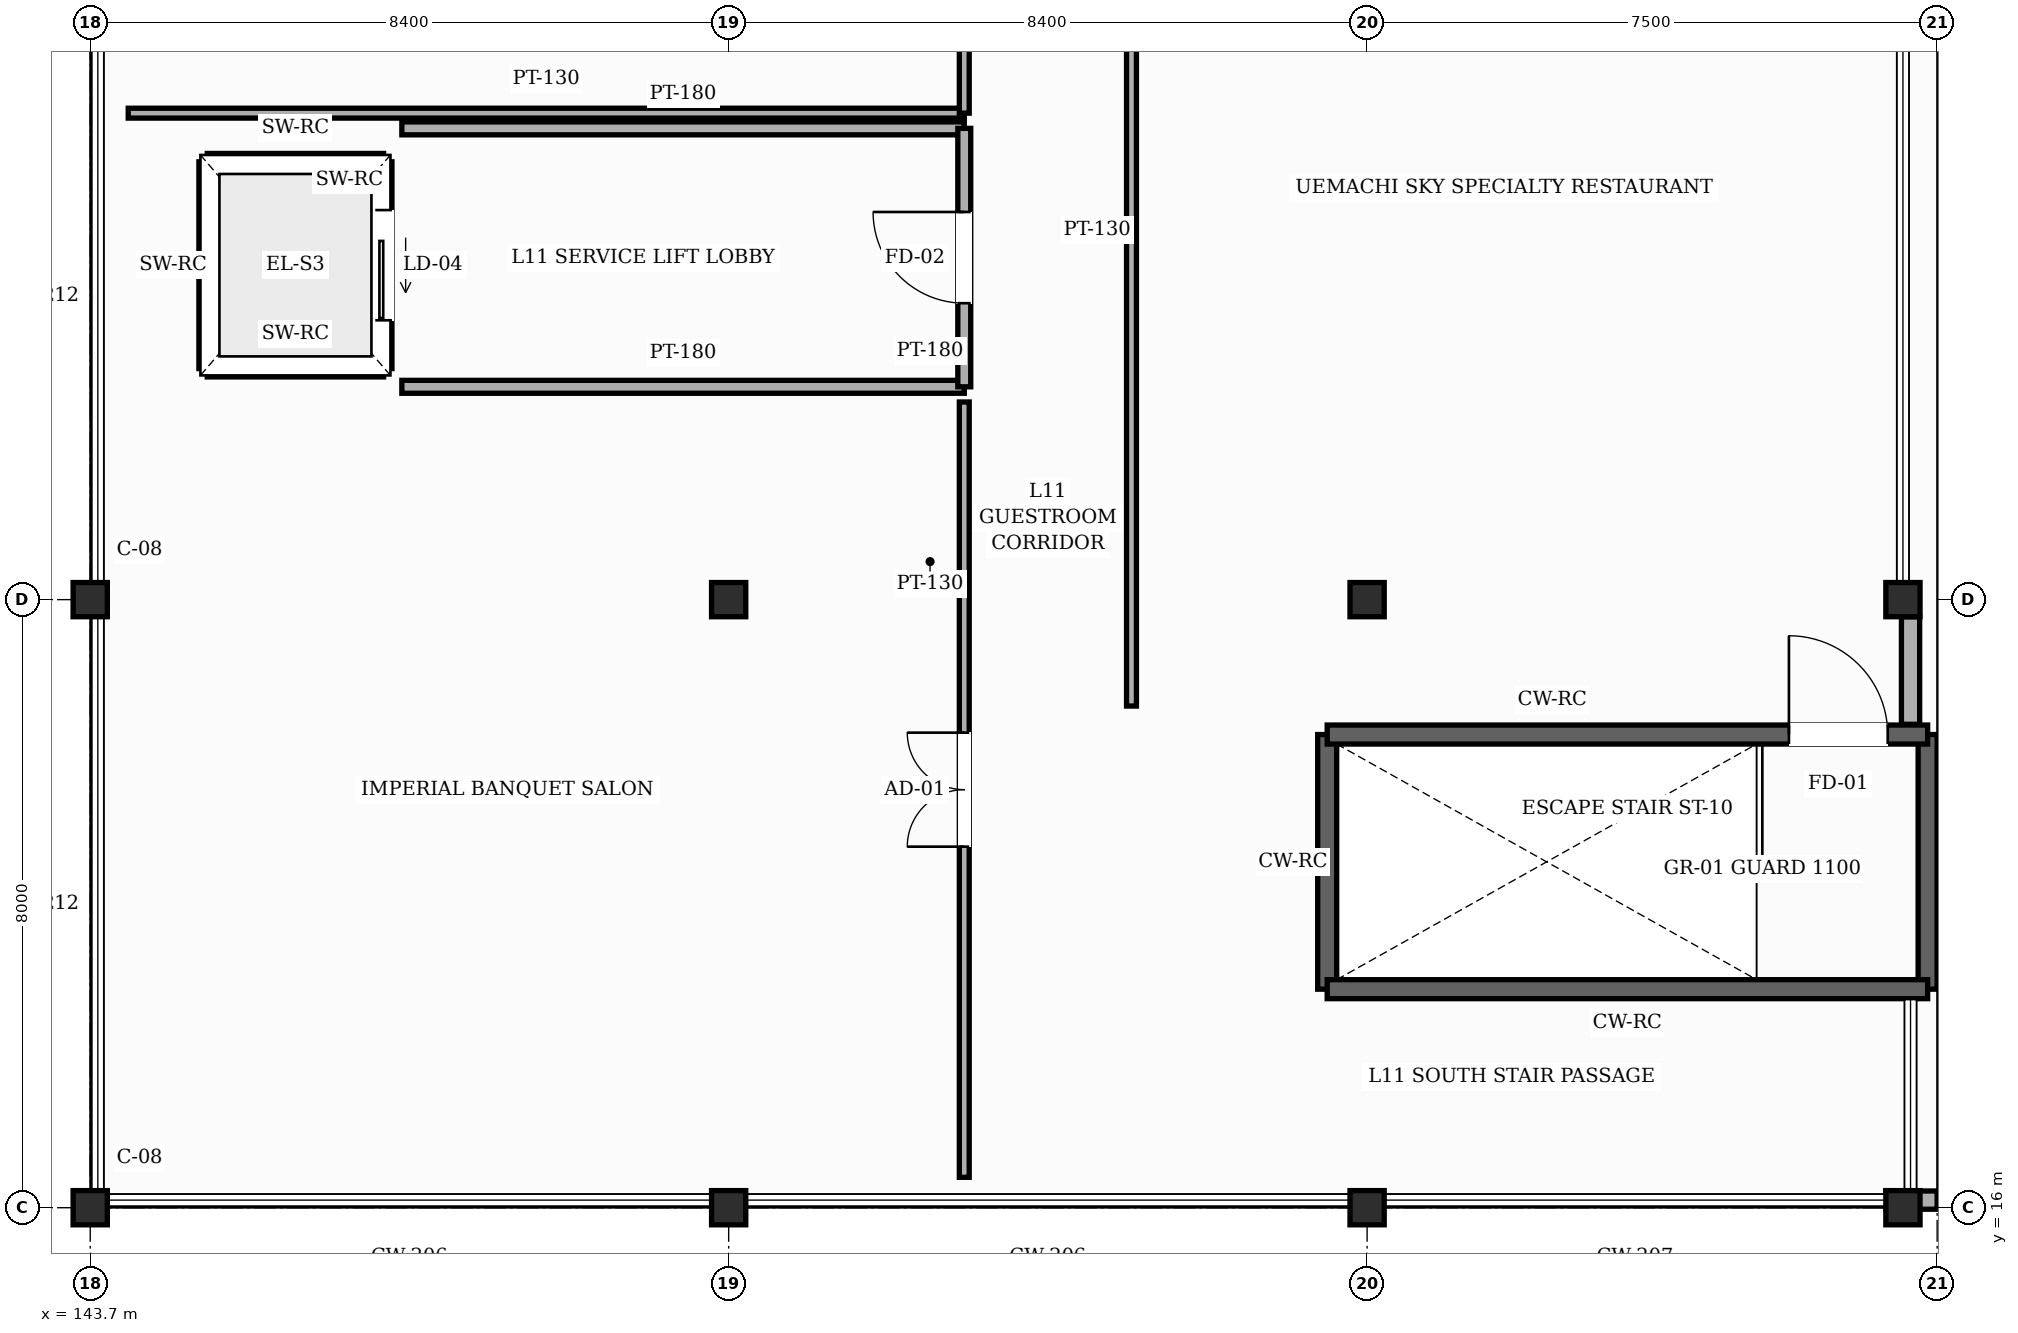
"""IFC4 building model, lengths in metres.
Left out: names, types, materials, properties, quantities, classifications, styles, units other than length and angle.
Written with IfcOpenShell. Run it as: python <this file> out.ifc"""

import sys

from ifc_helpers import new_model, si_unit, direction, frame, frame_2d, origin, origin_2d, place, context, subcontext, project, spatial, rectangle, hollow_rectangle, extrude, element, fill, save


model = new_model("IFC4")
c1 = context("Model", 3, precision=1e-05, world=origin(), true_north=direction((0.0, 1.0)))
c2 = subcontext(c1, "Body", "Model", "MODEL_VIEW")
j1 = project(units=[si_unit("LENGTHUNIT", "METRE"), si_unit("PLANEANGLEUNIT", "RADIAN")], contexts=[c1])
p1 = place(None, origin())
s1 = spatial("IfcSite", under=j1, at=p1, CompositionType="ELEMENT")
p2 = place(p1, origin())
s2 = spatial("IfcBuilding", under=s1, at=p2, CompositionType="ELEMENT")
p3 = place(p2, frame((0.0, 0.0, 46.2)))
s3 = spatial("IfcBuildingStorey", under=s2, at=p3, CompositionType="ELEMENT", Elevation=46.2)
for number, where, z_axis, x_axis in (
    (1, (143.7, 16.0, 0.0), (0.0, 0.0, 1.0), (1.0, 0.0, 0.0)),
    (2, (143.7, 24.0, 0.0), (0.0, 0.0, 1.0), (1.0, 0.0, 0.0)),
    (3, (152.1, 16.0, 0.0), (0.0, 0.0, 1.0), (1.0, 0.0, 0.0)),
    (4, (152.1, 24.0, 0.0), (0.0, 0.0, 1.0), (1.0, 0.0, 0.0)),
    (5, (160.5, 16.0, 0.0), (0.0, 0.0, 1.0), (1.0, 0.0, 0.0)),
    (6, (160.5, 24.0, 0.0), (0.0, 0.0, 1.0), (1.0, 0.0, 0.0)),
    (7, (167.55, 16.0, 0.0), (0.0, 0.0, 1.0), (1.0, 0.0, 0.0)),
    (8, (167.55, 24.0, 0.0), (0.0, 0.0, 1.0), (1.0, 0.0, 0.0)),
):
    element("IfcColumn", number, at=place(p3, frame(where, z_axis=z_axis, x_axis=x_axis)), inside=s3, PredefinedType="COLUMN", context=c2, shape_type="SweptSolid", body=[
        extrude(hollow_rectangle(XDim=0.45, YDim=0.45, WallThickness=0.019, InnerFilletRadius=0.019, OuterFilletRadius=0.038, at=origin_2d()), origin(), (0.0, 0.0, 1.0), 3.99),
    ])
p4 = place(p3, frame((168.0, 16.1, 0.0), z_axis=(0.0, 0.0, 1.0), x_axis=(-1.0, 0.0, 0.0)))
e9 = element("IfcWall", 9, at=p4, inside=s3, PredefinedType="SOLIDWALL", context=c2, shape_type="SweptSolid", body=[
    extrude(rectangle(XDim=0.675, YDim=0.24, at=frame_2d((0.337, 0.0))), origin(), (0.0, 0.0, 1.0), 3.935),
])
p5 = place(p3, frame((167.65, 23.775, 0.0), z_axis=(0.0, 0.0, 1.0), x_axis=(0.0, -1.0, 0.0)))
e10 = element("IfcWall", 10, at=p5, inside=s3, PredefinedType="SOLIDWALL", context=c2, shape_type="SweptSolid", body=[
    extrude(rectangle(XDim=1.415, YDim=0.24, at=frame_2d((0.708, 0.0))), origin(), (0.0, 0.0, 1.0), 3.935),
])
for number, where, z_axis, x_axis in (
    (11, (167.875, 22.225, 0.0), (0.0, 0.0, 1.0), (0.0, -1.0, 0.0)),
    (12, (159.975, 18.875, 0.0), (0.0, 0.0, 1.0), (0.0, 1.0, 0.0)),
):
    element("IfcWall", number, at=place(p3, frame(where, z_axis=z_axis, x_axis=x_axis)), inside=s3, PredefinedType="SHEAR", context=c2, shape_type="SweptSolid", body=[
        extrude(rectangle(XDim=3.35, YDim=0.25, at=frame_2d((1.675, 0.0))), origin(), (0.0, 0.0, 1.0), 3.95),
    ])
p6 = place(p3, frame((159.975, 22.225, 0.0), z_axis=(0.0, 0.0, 1.0), x_axis=(1.0, 0.0, 0.0)))
e13 = element("IfcWall", 13, at=p6, inside=s3, PredefinedType="SHEAR", context=c2, shape_type="SweptSolid", body=[
    extrude(rectangle(XDim=7.9, YDim=0.25, at=frame_2d((3.95, 0.0))), origin(), (0.0, 0.0, 1.0), 3.95),
])
p7 = place(p6, frame((6.075, 0.0, 0.0)))
e14 = element("IfcOpeningElement", 14, at=p7, cuts=e13, PredefinedType="OPENING", context=c2, shape_type="SweptSolid", body=[
    extrude(rectangle(XDim=1.3, YDim=2.2, at=frame_2d((0.65, 1.1))), frame((0.0, 0.135, 0.0), z_axis=(0.0, -1.0, 0.0), x_axis=(1.0, 0.0, 0.0)), (0.0, 0.0, 1.0), 0.27),
])
p8 = place(p3, frame((167.875, 18.875, 0.0), z_axis=(0.0, 0.0, 1.0), x_axis=(-1.0, 0.0, 0.0)))
e15 = element("IfcWall", 15, at=p8, inside=s3, PredefinedType="SHEAR", context=c2, shape_type="SweptSolid", body=[
    extrude(rectangle(XDim=7.9, YDim=0.25, at=frame_2d((3.95, 0.0))), origin(), (0.0, 0.0, 1.0), 3.95),
])
for number, where, z_axis, x_axis in (
    (16, (145.24, 29.76, 0.0), (0.0, 0.0, 1.0), (1.0, 0.0, 0.0)),
    (17, (145.24, 27.04, 0.0), (0.0, 0.0, 1.0), (1.0, 0.0, 0.0)),
):
    element("IfcWall", number, at=place(p3, frame(where, z_axis=z_axis, x_axis=x_axis)), inside=s3, PredefinedType="SHEAR", context=c2, shape_type="SweptSolid", body=[
        extrude(rectangle(XDim=2.32, YDim=0.22, at=frame_2d((1.16, 0.0))), origin(), (0.0, 0.0, 1.0), 3.95),
    ])
p9 = place(p3, frame((147.56, 27.04, 0.0), z_axis=(0.0, 0.0, 1.0), x_axis=(0.0, 1.0, 0.0)))
e18 = element("IfcWall", 18, at=p9, inside=s3, PredefinedType="SHEAR", context=c2, shape_type="SweptSolid", body=[
    extrude(rectangle(XDim=2.72, YDim=0.22, at=frame_2d((1.36, 0.0))), origin(), (0.0, 0.0, 1.0), 3.95),
])
p10 = place(p9, frame((0.635, 0.0, 0.0)))
e19 = element("IfcOpeningElement", 19, at=p10, cuts=e18, PredefinedType="OPENING", context=c2, shape_type="SweptSolid", body=[
    extrude(rectangle(XDim=1.45, YDim=2.35, at=frame_2d((0.725, 1.175))), frame((0.0, 0.12, 0.0), z_axis=(0.0, -1.0, 0.0), x_axis=(1.0, 0.0, 0.0)), (0.0, 0.0, 1.0), 0.24),
])
p11 = place(p3, frame((145.24, 27.04, 0.0), z_axis=(0.0, 0.0, 1.0), x_axis=(0.0, 1.0, 0.0)))
e20 = element("IfcWall", 20, at=p11, inside=s3, PredefinedType="SHEAR", context=c2, shape_type="SweptSolid", body=[
    extrude(rectangle(XDim=2.72, YDim=0.22, at=frame_2d((1.36, 0.0))), origin(), (0.0, 0.0, 1.0), 3.95),
])
for number, where, z_axis, x_axis in (
    (21, (147.8, 26.8, 0.0), (0.0, 0.0, 1.0), (1.0, 0.0, 0.0)),
    (22, (147.8, 30.2, 0.0), (0.0, 0.0, 1.0), (1.0, 0.0, 0.0)),
):
    element("IfcWall", number, at=place(p3, frame(where, z_axis=z_axis, x_axis=x_axis)), inside=s3, PredefinedType="PARTITIONING", context=c2, shape_type="SweptSolid", body=[
        extrude(rectangle(XDim=7.4, YDim=0.17, at=frame_2d((3.7, 0.0))), origin(), (0.0, 0.0, 1.0), 3.935),
    ])
p12 = place(p3, frame((144.2, 30.4, 0.0), z_axis=(0.0, 0.0, 1.0), x_axis=(1.0, 0.0, 0.0)))
e23 = element("IfcWall", 23, at=p12, inside=s3, PredefinedType="PARTITIONING", context=c2, shape_type="SweptSolid", body=[
    extrude(rectangle(XDim=11.0, YDim=0.13, at=frame_2d((5.5, 0.0))), origin(), (0.0, 0.0, 1.0), 3.935),
])
p13 = place(p3, frame((155.2, 16.4, 0.0), z_axis=(0.0, 0.0, 1.0), x_axis=(0.0, 1.0, 0.0)))
e24 = element("IfcWall", 24, at=p13, inside=s3, PredefinedType="PARTITIONING", context=c2, shape_type="SweptSolid", body=[
    extrude(rectangle(XDim=10.2, YDim=0.13, at=frame_2d((5.1, 0.0))), origin(), (0.0, 0.0, 1.0), 3.935),
])
p14 = place(p13, frame((4.35, 0.0, 0.0)))
e25 = element("IfcOpeningElement", 25, at=p14, cuts=e24, PredefinedType="OPENING", context=c2, shape_type="SweptSolid", body=[
    extrude(rectangle(XDim=1.5, YDim=2.3, at=frame_2d((0.75, 1.15))), frame((0.0, 0.075, 0.0), z_axis=(0.0, -1.0, 0.0), x_axis=(1.0, 0.0, 0.0)), (0.0, 0.0, 1.0), 0.15),
])
p15 = place(p3, frame((155.2, 26.8, 0.0), z_axis=(0.0, 0.0, 1.0), x_axis=(0.0, 1.0, 0.0)))
e26 = element("IfcWall", 26, at=p15, inside=s3, PredefinedType="PARTITIONING", context=c2, shape_type="SweptSolid", body=[
    extrude(rectangle(XDim=3.4, YDim=0.17, at=frame_2d((1.7, 0.0))), origin(), (0.0, 0.0, 1.0), 3.935),
])
p16 = place(p15, frame((1.1, 0.0, 0.0)))
e27 = element("IfcOpeningElement", 27, at=p16, cuts=e26, PredefinedType="OPENING", context=c2, shape_type="SweptSolid", body=[
    extrude(rectangle(XDim=1.2, YDim=2.2, at=frame_2d((0.6, 1.1))), frame((0.0, 0.095, 0.0), z_axis=(0.0, -1.0, 0.0), x_axis=(1.0, 0.0, 0.0)), (0.0, 0.0, 1.0), 0.19),
])
p17 = place(p3, frame((155.2, 30.4, 0.0), z_axis=(0.0, 0.0, 1.0), x_axis=(0.0, 1.0, 0.0)))
e28 = element("IfcWall", 28, at=p17, inside=s3, PredefinedType="PARTITIONING", context=c2, shape_type="SweptSolid", body=[
    extrude(rectangle(XDim=10.2, YDim=0.13, at=frame_2d((5.1, 0.0))), origin(), (0.0, 0.0, 1.0), 3.935),
])
p18 = place(p17, frame((4.5, 0.0, 0.0)))
e29 = element("IfcOpeningElement", 29, at=p18, cuts=e28, PredefinedType="OPENING", context=c2, shape_type="SweptSolid", body=[
    extrude(rectangle(XDim=1.2, YDim=2.2, at=frame_2d((0.6, 1.1))), frame((0.0, 0.075, 0.0), z_axis=(0.0, -1.0, 0.0), x_axis=(1.0, 0.0, 0.0)), (0.0, 0.0, 1.0), 0.15),
])
p19 = place(p3, frame((157.4, 22.6, 0.0), z_axis=(0.0, 0.0, 1.0), x_axis=(0.0, 1.0, 0.0)))
e30 = element("IfcWall", 30, at=p19, inside=s3, PredefinedType="PARTITIONING", context=c2, shape_type="SweptSolid", body=[
    extrude(rectangle(XDim=48.2, YDim=0.13, at=frame_2d((24.1, 0.0))), origin(), (0.0, 0.0, 1.0), 3.935),
])
p20 = place(p19, frame((12.675, 0.0, 0.0)))
e31 = element("IfcOpeningElement", 31, at=p20, cuts=e30, PredefinedType="OPENING", context=c2, shape_type="SweptSolid", body=[
    extrude(rectangle(XDim=2.05, YDim=2.45, at=frame_2d((1.025, 1.225))), frame((0.0, 0.075, 0.0), z_axis=(0.0, -1.0, 0.0), x_axis=(1.0, 0.0, 0.0)), (0.0, 0.0, 1.0), 0.15),
])
p21 = place(p19, frame((36.975, 0.0, 0.0)))
e32 = element("IfcOpeningElement", 32, at=p21, cuts=e30, PredefinedType="OPENING", context=c2, shape_type="SweptSolid", body=[
    extrude(rectangle(XDim=1.65, YDim=2.35, at=frame_2d((0.825, 1.175))), frame((0.0, 0.075, 0.0), z_axis=(0.0, -1.0, 0.0), x_axis=(1.0, 0.0, 0.0)), (0.0, 0.0, 1.0), 0.15),
])
p22 = place(p7, origin())
e33 = element("IfcDoor", 33, at=p22, inside=s3, OperationType="SINGLE_SWING_LEFT", PredefinedType="DOOR", context=c2, shape_type="SweptSolid", body=[
    extrude(rectangle(XDim=1.3, YDim=2.2, at=frame_2d((0.65, 1.1))), frame((0.0, 0.025, 0.0), z_axis=(0.0, -1.0, 0.0), x_axis=(1.0, 0.0, 0.0)), (0.0, 0.0, 1.0), 0.05),
])
fill(e14, e33)
p23 = place(p10, origin())
e34 = element("IfcDoor", 34, at=p23, inside=s3, OperationType="SLIDING_TO_LEFT", PredefinedType="DOOR", context=c2, shape_type="SweptSolid", body=[
    extrude(rectangle(XDim=1.45, YDim=2.35, at=frame_2d((0.725, 1.175))), frame((0.0, 0.025, 0.0), z_axis=(0.0, -1.0, 0.0), x_axis=(1.0, 0.0, 0.0)), (0.0, 0.0, 1.0), 0.05),
])
fill(e19, e34)
p24 = place(p16, origin())
e35 = element("IfcDoor", 35, at=p24, inside=s3, OperationType="SINGLE_SWING_RIGHT", PredefinedType="DOOR", context=c2, shape_type="SweptSolid", body=[
    extrude(rectangle(XDim=1.2, YDim=2.2, at=frame_2d((0.6, 1.1))), frame((0.0, 0.025, 0.0), z_axis=(0.0, -1.0, 0.0), x_axis=(1.0, 0.0, 0.0)), (0.0, 0.0, 1.0), 0.05),
])
fill(e27, e35)
p25 = place(p14, origin())
e36 = element("IfcDoor", 36, at=p25, inside=s3, OperationType="DOUBLE_DOOR_SINGLE_SWING", PredefinedType="DOOR", context=c2, shape_type="SweptSolid", body=[
    extrude(rectangle(XDim=1.5, YDim=2.3, at=frame_2d((0.75, 1.15))), frame((0.0, 0.025, 0.0), z_axis=(0.0, -1.0, 0.0), x_axis=(1.0, 0.0, 0.0)), (0.0, 0.0, 1.0), 0.05),
])
fill(e25, e36)
save(model, sys.argv[1])
